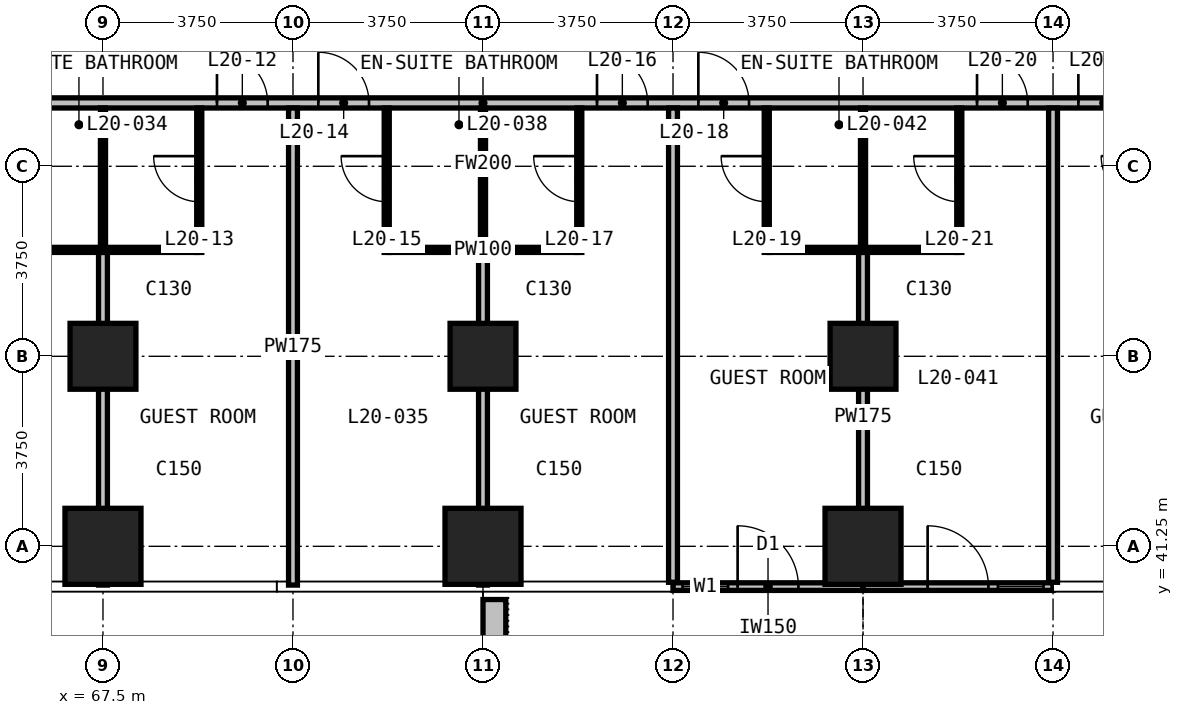
"""IFC4 building model, lengths in metres.
Left out: names, types, materials, properties, quantities, classifications, styles, units other than length and angle.
Written with IfcOpenShell. Run it as: python <this file> out.ifc"""

import sys

from ifc_helpers import new_model, si_unit, direction, frame, frame_2d, origin, origin_2d, place, context, subcontext, project, spatial, rectangle, extrude, element, fill, save


model = new_model("IFC4")
c1 = context("Model", 3, precision=1e-05, world=origin(), true_north=direction((0.0, 1.0)))
c2 = subcontext(c1, "Body", "Model", "MODEL_VIEW")
j1 = project(units=[si_unit("LENGTHUNIT", "METRE"), si_unit("PLANEANGLEUNIT", "RADIAN")], contexts=[c1])
p1 = place(None, origin())
s1 = spatial("IfcSite", under=j1, at=p1, CompositionType="ELEMENT")
p2 = place(p1, origin())
s2 = spatial("IfcBuilding", under=s1, at=p2, CompositionType="ELEMENT")
p3 = place(p2, frame((0.0, 0.0, 85.7)))
s3 = spatial("IfcBuildingStorey", under=s2, at=p3, CompositionType="ELEMENT", Elevation=85.7)
p4 = place(p3, frame((67.5, 41.25, 0.0), z_axis=(0.0, 0.0, 1.0), x_axis=(1.0, 0.0, 0.0)))
e1 = element("IfcColumn", 1, at=p4, inside=s3, PredefinedType="COLUMN", context=c2, shape_type="SweptSolid", body=[
    extrude(rectangle(XDim=1.5, YDim=1.5, at=origin_2d()), origin(), (0.0, 0.0, 1.0), 3.3),
])
p5 = place(p3, frame((67.5, 45.0, 0.0), z_axis=(0.0, 0.0, 1.0), x_axis=(1.0, 0.0, 0.0)))
e2 = element("IfcColumn", 2, at=p5, inside=s3, PredefinedType="COLUMN", context=c2, shape_type="SweptSolid", body=[
    extrude(rectangle(XDim=1.3, YDim=1.3, at=origin_2d()), origin(), (0.0, 0.0, 1.0), 3.3),
])
p6 = place(p3, frame((75.0, 41.25, 0.0), z_axis=(0.0, 0.0, 1.0), x_axis=(1.0, 0.0, 0.0)))
e3 = element("IfcColumn", 3, at=p6, inside=s3, PredefinedType="COLUMN", context=c2, shape_type="SweptSolid", body=[
    extrude(rectangle(XDim=1.5, YDim=1.5, at=origin_2d()), origin(), (0.0, 0.0, 1.0), 3.3),
])
p7 = place(p3, frame((75.0, 45.0, 0.0), z_axis=(0.0, 0.0, 1.0), x_axis=(1.0, 0.0, 0.0)))
e4 = element("IfcColumn", 4, at=p7, inside=s3, PredefinedType="COLUMN", context=c2, shape_type="SweptSolid", body=[
    extrude(rectangle(XDim=1.3, YDim=1.3, at=origin_2d()), origin(), (0.0, 0.0, 1.0), 3.3),
])
p8 = place(p3, frame((82.5, 41.25, 0.0), z_axis=(0.0, 0.0, 1.0), x_axis=(1.0, 0.0, 0.0)))
e5 = element("IfcColumn", 5, at=p8, inside=s3, PredefinedType="COLUMN", context=c2, shape_type="SweptSolid", body=[
    extrude(rectangle(XDim=1.5, YDim=1.5, at=origin_2d()), origin(), (0.0, 0.0, 1.0), 3.3),
])
p9 = place(p3, frame((82.5, 45.0, 0.0), z_axis=(0.0, 0.0, 1.0), x_axis=(1.0, 0.0, 0.0)))
e6 = element("IfcColumn", 6, at=p9, inside=s3, PredefinedType="COLUMN", context=c2, shape_type="SweptSolid", body=[
    extrude(rectangle(XDim=1.3, YDim=1.3, at=origin_2d()), origin(), (0.0, 0.0, 1.0), 3.3),
])
p10 = place(p3, frame((78.75, 40.455, 0.0), z_axis=(0.0, 0.0, 1.0), x_axis=(1.0, 0.0, 0.0)))
e7 = element("IfcWall", 7, at=p10, inside=s3, PredefinedType="SOLIDWALL", context=c2, shape_type="SweptSolid", body=[
    extrude(rectangle(XDim=3.75, YDim=0.15, at=frame_2d((1.875, 0.0))), origin(), (0.0, 0.0, 1.0), 3.0),
])
p11 = place(p10, frame((0.188, 0.0, 0.1)))
e8 = element("IfcOpeningElement", 8, at=p11, cuts=e7, PredefinedType="OPENING", context=c2, shape_type="SweptSolid", body=[
    extrude(rectangle(XDim=0.9, YDim=2.4, at=frame_2d((0.45, 1.2))), frame((0.0, 0.085, 0.0), z_axis=(0.0, -1.0, 0.0), x_axis=(1.0, 0.0, 0.0)), (0.0, 0.0, 1.0), 0.17),
])
p12 = place(p10, frame((1.275, 0.0, 0.0)))
e9 = element("IfcOpeningElement", 9, at=p12, cuts=e7, PredefinedType="OPENING", context=c2, shape_type="SweptSolid", body=[
    extrude(rectangle(XDim=1.2, YDim=2.4, at=frame_2d((0.6, 1.2))), frame((0.0, 0.085, 0.0), z_axis=(0.0, -1.0, 0.0), x_axis=(1.0, 0.0, 0.0)), (0.0, 0.0, 1.0), 0.17),
])
p13 = place(p3, frame((82.5, 40.455, 0.0), z_axis=(0.0, 0.0, 1.0), x_axis=(1.0, 0.0, 0.0)))
e10 = element("IfcWall", 10, at=p13, inside=s3, PredefinedType="SOLIDWALL", context=c2, shape_type="SweptSolid", body=[
    extrude(rectangle(XDim=3.75, YDim=0.15, at=frame_2d((1.875, 0.0))), origin(), (0.0, 0.0, 1.0), 3.0),
])
p14 = place(p13, frame((1.275, 0.0, 0.0)))
e11 = element("IfcOpeningElement", 11, at=p14, cuts=e10, PredefinedType="OPENING", context=c2, shape_type="SweptSolid", body=[
    extrude(rectangle(XDim=1.2, YDim=2.4, at=frame_2d((0.6, 1.2))), frame((0.0, 0.085, 0.0), z_axis=(0.0, -1.0, 0.0), x_axis=(1.0, 0.0, 0.0)), (0.0, 0.0, 1.0), 0.17),
])
p15 = place(p13, frame((2.663, 0.0, 0.1)))
e12 = element("IfcOpeningElement", 12, at=p15, cuts=e10, PredefinedType="OPENING", context=c2, shape_type="SweptSolid", body=[
    extrude(rectangle(XDim=0.9, YDim=2.4, at=frame_2d((0.45, 1.2))), frame((0.0, 0.085, 0.0), z_axis=(0.0, -1.0, 0.0), x_axis=(1.0, 0.0, 0.0)), (0.0, 0.0, 1.0), 0.17),
])
p16 = place(p3, frame((75.225, 40.2, 0.0), z_axis=(0.0, 0.0, 1.0), x_axis=(0.0, -1.0, 0.0)))
e13 = element("IfcWall", 13, at=p16, inside=s3, PredefinedType="USERDEFINED", context=c2, shape_type="SweptSolid", body=[
    extrude(rectangle(XDim=2.35, YDim=0.45, at=frame_2d((1.175, 0.0))), origin(), (0.0, 0.0, 1.0), 1.1),
])
p17 = place(p3, frame((51.735, 50.0, 0.0), z_axis=(0.0, 0.0, 1.0), x_axis=(1.0, 0.0, 0.0)))
e14 = element("IfcWall", 14, at=p17, inside=s3, PredefinedType="PARTITIONING", context=c2, shape_type="SweptSolid", body=[
    extrude(rectangle(XDim=46.53, YDim=0.2, at=frame_2d((23.265, 0.0))), origin(), (0.0, 0.0, 1.0), 3.0),
])
p18 = place(p17, frame((6.765, 0.0, 0.0)))
e15 = element("IfcOpeningElement", 15, at=p18, cuts=e14, PredefinedType="OPENING", context=c2, shape_type="SweptSolid", body=[
    extrude(rectangle(XDim=1.0, YDim=2.2, at=frame_2d((0.5, 1.1))), frame((0.0, 0.11, 0.0), z_axis=(0.0, -1.0, 0.0), x_axis=(1.0, 0.0, 0.0)), (0.0, 0.0, 1.0), 0.22),
])
p19 = place(p17, frame((10.515, 0.0, 0.0)))
e16 = element("IfcOpeningElement", 16, at=p19, cuts=e14, PredefinedType="OPENING", context=c2, shape_type="SweptSolid", body=[
    extrude(rectangle(XDim=1.0, YDim=2.2, at=frame_2d((0.5, 1.1))), frame((0.0, 0.11, 0.0), z_axis=(0.0, -1.0, 0.0), x_axis=(1.0, 0.0, 0.0)), (0.0, 0.0, 1.0), 0.22),
])
p20 = place(p17, frame((12.515, 0.0, 0.0)))
e17 = element("IfcOpeningElement", 17, at=p20, cuts=e14, PredefinedType="OPENING", context=c2, shape_type="SweptSolid", body=[
    extrude(rectangle(XDim=1.0, YDim=2.2, at=frame_2d((0.5, 1.1))), frame((0.0, 0.11, 0.0), z_axis=(0.0, -1.0, 0.0), x_axis=(1.0, 0.0, 0.0)), (0.0, 0.0, 1.0), 0.22),
])
p21 = place(p17, frame((18.015, 0.0, 0.0)))
e18 = element("IfcOpeningElement", 18, at=p21, cuts=e14, PredefinedType="OPENING", context=c2, shape_type="SweptSolid", body=[
    extrude(rectangle(XDim=1.0, YDim=2.2, at=frame_2d((0.5, 1.1))), frame((0.0, 0.11, 0.0), z_axis=(0.0, -1.0, 0.0), x_axis=(1.0, 0.0, 0.0)), (0.0, 0.0, 1.0), 0.22),
])
p22 = place(p17, frame((20.015, 0.0, 0.0)))
e19 = element("IfcOpeningElement", 19, at=p22, cuts=e14, PredefinedType="OPENING", context=c2, shape_type="SweptSolid", body=[
    extrude(rectangle(XDim=1.0, YDim=2.2, at=frame_2d((0.5, 1.1))), frame((0.0, 0.11, 0.0), z_axis=(0.0, -1.0, 0.0), x_axis=(1.0, 0.0, 0.0)), (0.0, 0.0, 1.0), 0.22),
])
p23 = place(p17, frame((25.515, 0.0, 0.0)))
e20 = element("IfcOpeningElement", 20, at=p23, cuts=e14, PredefinedType="OPENING", context=c2, shape_type="SweptSolid", body=[
    extrude(rectangle(XDim=1.0, YDim=2.2, at=frame_2d((0.5, 1.1))), frame((0.0, 0.11, 0.0), z_axis=(0.0, -1.0, 0.0), x_axis=(1.0, 0.0, 0.0)), (0.0, 0.0, 1.0), 0.22),
])
p24 = place(p17, frame((27.515, 0.0, 0.0)))
e21 = element("IfcOpeningElement", 21, at=p24, cuts=e14, PredefinedType="OPENING", context=c2, shape_type="SweptSolid", body=[
    extrude(rectangle(XDim=1.0, YDim=2.2, at=frame_2d((0.5, 1.1))), frame((0.0, 0.11, 0.0), z_axis=(0.0, -1.0, 0.0), x_axis=(1.0, 0.0, 0.0)), (0.0, 0.0, 1.0), 0.22),
])
p25 = place(p17, frame((33.015, 0.0, 0.0)))
e22 = element("IfcOpeningElement", 22, at=p25, cuts=e14, PredefinedType="OPENING", context=c2, shape_type="SweptSolid", body=[
    extrude(rectangle(XDim=1.0, YDim=2.2, at=frame_2d((0.5, 1.1))), frame((0.0, 0.11, 0.0), z_axis=(0.0, -1.0, 0.0), x_axis=(1.0, 0.0, 0.0)), (0.0, 0.0, 1.0), 0.22),
])
p26 = place(p17, frame((35.015, 0.0, 0.0)))
e23 = element("IfcOpeningElement", 23, at=p26, cuts=e14, PredefinedType="OPENING", context=c2, shape_type="SweptSolid", body=[
    extrude(rectangle(XDim=1.0, YDim=2.2, at=frame_2d((0.5, 1.1))), frame((0.0, 0.11, 0.0), z_axis=(0.0, -1.0, 0.0), x_axis=(1.0, 0.0, 0.0)), (0.0, 0.0, 1.0), 0.22),
])
p27 = place(p17, frame((38.765, 0.0, 0.0)))
e24 = element("IfcOpeningElement", 24, at=p27, cuts=e14, PredefinedType="OPENING", context=c2, shape_type="SweptSolid", body=[
    extrude(rectangle(XDim=1.0, YDim=2.2, at=frame_2d((0.5, 1.1))), frame((0.0, 0.11, 0.0), z_axis=(0.0, -1.0, 0.0), x_axis=(1.0, 0.0, 0.0)), (0.0, 0.0, 1.0), 0.22),
])
p28 = place(p17, frame((1.8, 0.0, 0.0)))
e25 = element("IfcOpeningElement", 25, at=p28, cuts=e14, PredefinedType="OPENING", context=c2, shape_type="SweptSolid", body=[
    extrude(rectangle(XDim=0.9, YDim=2.2, at=frame_2d((0.45, 1.1))), frame((0.0, 0.11, 0.0), z_axis=(0.0, -1.0, 0.0), x_axis=(1.0, 0.0, 0.0)), (0.0, 0.0, 1.0), 0.22),
])
p29 = place(p17, frame((43.815, 0.0, 0.0)))
e26 = element("IfcOpeningElement", 26, at=p29, cuts=e14, PredefinedType="OPENING", context=c2, shape_type="SweptSolid", body=[
    extrude(rectangle(XDim=0.9, YDim=2.2, at=frame_2d((0.45, 1.1))), frame((0.0, 0.11, 0.0), z_axis=(0.0, -1.0, 0.0), x_axis=(1.0, 0.0, 0.0)), (0.0, 0.0, 1.0), 0.22),
])
p30 = place(p3, frame((67.5, 40.485, 0.0), z_axis=(0.0, 0.0, 1.0), x_axis=(0.0, 1.0, 0.0)))
e27 = element("IfcWall", 27, at=p30, inside=s3, PredefinedType="PARTITIONING", context=c2, shape_type="SweptSolid", body=[
    extrude(rectangle(XDim=6.565, YDim=0.175, at=frame_2d((3.282, 0.0))), origin(), (0.0, 0.0, 1.0), 3.0),
])
p31 = place(p3, frame((71.25, 40.485, 0.0), z_axis=(0.0, 0.0, 1.0), x_axis=(0.0, 1.0, 0.0)))
e28 = element("IfcWall", 28, at=p31, inside=s3, PredefinedType="PARTITIONING", context=c2, shape_type="SweptSolid", body=[
    extrude(rectangle(XDim=9.415, YDim=0.175, at=frame_2d((4.708, 0.0))), origin(), (0.0, 0.0, 1.0), 3.0),
])
p32 = place(p3, frame((75.0, 40.485, 0.0), z_axis=(0.0, 0.0, 1.0), x_axis=(0.0, 1.0, 0.0)))
e29 = element("IfcWall", 29, at=p32, inside=s3, PredefinedType="PARTITIONING", context=c2, shape_type="SweptSolid", body=[
    extrude(rectangle(XDim=6.565, YDim=0.175, at=frame_2d((3.282, 0.0))), origin(), (0.0, 0.0, 1.0), 3.0),
])
p33 = place(p3, frame((78.75, 40.54, 0.0), z_axis=(0.0, 0.0, 1.0), x_axis=(0.0, 1.0, 0.0)))
e30 = element("IfcWall", 30, at=p33, inside=s3, PredefinedType="PARTITIONING", context=c2, shape_type="SweptSolid", body=[
    extrude(rectangle(XDim=9.36, YDim=0.175, at=frame_2d((4.68, 0.0))), origin(), (0.0, 0.0, 1.0), 3.0),
])
p34 = place(p3, frame((82.5, 40.54, 0.0), z_axis=(0.0, 0.0, 1.0), x_axis=(0.0, 1.0, 0.0)))
e31 = element("IfcWall", 31, at=p34, inside=s3, PredefinedType="PARTITIONING", context=c2, shape_type="SweptSolid", body=[
    extrude(rectangle(XDim=6.51, YDim=0.175, at=frame_2d((3.255, 0.0))), origin(), (0.0, 0.0, 1.0), 3.0),
])
p35 = place(p3, frame((86.25, 40.54, 0.0), z_axis=(0.0, 0.0, 1.0), x_axis=(0.0, 1.0, 0.0)))
e32 = element("IfcWall", 32, at=p35, inside=s3, PredefinedType="PARTITIONING", context=c2, shape_type="SweptSolid", body=[
    extrude(rectangle(XDim=9.36, YDim=0.175, at=frame_2d((4.68, 0.0))), origin(), (0.0, 0.0, 1.0), 3.0),
])
for number, where, z_axis, x_axis in (
    (33, (65.65, 47.1, 0.0), (0.0, 0.0, 1.0), (1.0, 0.0, 0.0)),
    (34, (73.15, 47.1, 0.0), (0.0, 0.0, 1.0), (1.0, 0.0, 0.0)),
    (35, (80.65, 47.1, 0.0), (0.0, 0.0, 1.0), (1.0, 0.0, 0.0)),
):
    element("IfcWall", number, at=place(p3, frame(where, z_axis=z_axis, x_axis=x_axis)), inside=s3, PredefinedType="PARTITIONING", context=c2, shape_type="SweptSolid", body=[
        extrude(rectangle(XDim=3.7, YDim=0.1, at=frame_2d((1.85, 0.0))), origin(), (0.0, 0.0, 1.0), 3.0),
    ])
p36 = place(p3, frame((67.5, 47.15, 0.0), z_axis=(0.0, 0.0, 1.0), x_axis=(0.0, 1.0, 0.0)))
e36 = element("IfcWall", 36, at=p36, inside=s3, PredefinedType="PARTITIONING", context=c2, shape_type="SweptSolid", body=[
    extrude(rectangle(XDim=2.75, YDim=0.1, at=frame_2d((1.375, 0.0))), origin(), (0.0, 0.0, 1.0), 3.0),
])
p37 = place(p3, frame((69.4, 47.05, 0.0), z_axis=(0.0, 0.0, 1.0), x_axis=(0.0, 1.0, 0.0)))
e37 = element("IfcWall", 37, at=p37, inside=s3, PredefinedType="PARTITIONING", context=c2, shape_type="SweptSolid", body=[
    extrude(rectangle(XDim=2.85, YDim=0.1, at=frame_2d((1.425, 0.0))), origin(), (0.0, 0.0, 1.0), 3.0),
])
p38 = place(p37, frame((1.0, 0.0, 0.0)))
e38 = element("IfcOpeningElement", 38, at=p38, cuts=e37, PredefinedType="OPENING", context=c2, shape_type="SweptSolid", body=[
    extrude(rectangle(XDim=0.9, YDim=2.2, at=frame_2d((0.45, 1.1))), frame((0.0, 0.06, 0.0), z_axis=(0.0, -1.0, 0.0), x_axis=(1.0, 0.0, 0.0)), (0.0, 0.0, 1.0), 0.12),
])
p39 = place(p3, frame((73.1, 47.05, 0.0), z_axis=(0.0, 0.0, 1.0), x_axis=(0.0, 1.0, 0.0)))
e39 = element("IfcWall", 39, at=p39, inside=s3, PredefinedType="PARTITIONING", context=c2, shape_type="SweptSolid", body=[
    extrude(rectangle(XDim=2.85, YDim=0.1, at=frame_2d((1.425, 0.0))), origin(), (0.0, 0.0, 1.0), 3.0),
])
p40 = place(p39, frame((1.0, 0.0, 0.0)))
e40 = element("IfcOpeningElement", 40, at=p40, cuts=e39, PredefinedType="OPENING", context=c2, shape_type="SweptSolid", body=[
    extrude(rectangle(XDim=0.9, YDim=2.2, at=frame_2d((0.45, 1.1))), frame((0.0, 0.06, 0.0), z_axis=(0.0, -1.0, 0.0), x_axis=(1.0, 0.0, 0.0)), (0.0, 0.0, 1.0), 0.12),
])
p41 = place(p3, frame((75.0, 47.15, 0.0), z_axis=(0.0, 0.0, 1.0), x_axis=(0.0, 1.0, 0.0)))
e41 = element("IfcWall", 41, at=p41, inside=s3, PredefinedType="PARTITIONING", context=c2, shape_type="SweptSolid", body=[
    extrude(rectangle(XDim=2.75, YDim=0.1, at=frame_2d((1.375, 0.0))), origin(), (0.0, 0.0, 1.0), 3.0),
])
p42 = place(p3, frame((76.9, 47.05, 0.0), z_axis=(0.0, 0.0, 1.0), x_axis=(0.0, 1.0, 0.0)))
e42 = element("IfcWall", 42, at=p42, inside=s3, PredefinedType="PARTITIONING", context=c2, shape_type="SweptSolid", body=[
    extrude(rectangle(XDim=2.85, YDim=0.1, at=frame_2d((1.425, 0.0))), origin(), (0.0, 0.0, 1.0), 3.0),
])
p43 = place(p42, frame((1.0, 0.0, 0.0)))
e43 = element("IfcOpeningElement", 43, at=p43, cuts=e42, PredefinedType="OPENING", context=c2, shape_type="SweptSolid", body=[
    extrude(rectangle(XDim=0.9, YDim=2.2, at=frame_2d((0.45, 1.1))), frame((0.0, 0.06, 0.0), z_axis=(0.0, -1.0, 0.0), x_axis=(1.0, 0.0, 0.0)), (0.0, 0.0, 1.0), 0.12),
])
p44 = place(p3, frame((80.6, 47.05, 0.0), z_axis=(0.0, 0.0, 1.0), x_axis=(0.0, 1.0, 0.0)))
e44 = element("IfcWall", 44, at=p44, inside=s3, PredefinedType="PARTITIONING", context=c2, shape_type="SweptSolid", body=[
    extrude(rectangle(XDim=2.85, YDim=0.1, at=frame_2d((1.425, 0.0))), origin(), (0.0, 0.0, 1.0), 3.0),
])
p45 = place(p44, frame((1.0, 0.0, 0.0)))
e45 = element("IfcOpeningElement", 45, at=p45, cuts=e44, PredefinedType="OPENING", context=c2, shape_type="SweptSolid", body=[
    extrude(rectangle(XDim=0.9, YDim=2.2, at=frame_2d((0.45, 1.1))), frame((0.0, 0.06, 0.0), z_axis=(0.0, -1.0, 0.0), x_axis=(1.0, 0.0, 0.0)), (0.0, 0.0, 1.0), 0.12),
])
p46 = place(p3, frame((82.5, 47.15, 0.0), z_axis=(0.0, 0.0, 1.0), x_axis=(0.0, 1.0, 0.0)))
e46 = element("IfcWall", 46, at=p46, inside=s3, PredefinedType="PARTITIONING", context=c2, shape_type="SweptSolid", body=[
    extrude(rectangle(XDim=2.75, YDim=0.1, at=frame_2d((1.375, 0.0))), origin(), (0.0, 0.0, 1.0), 3.0),
])
p47 = place(p3, frame((84.4, 47.05, 0.0), z_axis=(0.0, 0.0, 1.0), x_axis=(0.0, 1.0, 0.0)))
e47 = element("IfcWall", 47, at=p47, inside=s3, PredefinedType="PARTITIONING", context=c2, shape_type="SweptSolid", body=[
    extrude(rectangle(XDim=2.85, YDim=0.1, at=frame_2d((1.425, 0.0))), origin(), (0.0, 0.0, 1.0), 3.0),
])
p48 = place(p47, frame((1.0, 0.0, 0.0)))
e48 = element("IfcOpeningElement", 48, at=p48, cuts=e47, PredefinedType="OPENING", context=c2, shape_type="SweptSolid", body=[
    extrude(rectangle(XDim=0.9, YDim=2.2, at=frame_2d((0.45, 1.1))), frame((0.0, 0.06, 0.0), z_axis=(0.0, -1.0, 0.0), x_axis=(1.0, 0.0, 0.0)), (0.0, 0.0, 1.0), 0.12),
])
p49 = place(p11, origin())
e49 = element("IfcWindow", 49, at=p49, inside=s3, PartitioningType="SINGLE_PANEL", PredefinedType="WINDOW", context=c2, shape_type="SweptSolid", body=[
    extrude(rectangle(XDim=0.9, YDim=2.4, at=frame_2d((0.45, 1.2))), frame((0.0, 0.03, 0.0), z_axis=(0.0, -1.0, 0.0), x_axis=(1.0, 0.0, 0.0)), (0.0, 0.0, 1.0), 0.06),
])
fill(e8, e49)
p50 = place(p12, origin())
e50 = element("IfcDoor", 50, at=p50, inside=s3, OperationType="SINGLE_SWING_LEFT", PredefinedType="DOOR", context=c2, shape_type="SweptSolid", body=[
    extrude(rectangle(XDim=1.2, YDim=2.4, at=frame_2d((0.6, 1.2))), frame((0.0, 0.025, 0.0), z_axis=(0.0, -1.0, 0.0), x_axis=(1.0, 0.0, 0.0)), (0.0, 0.0, 1.0), 0.05),
])
fill(e9, e50)
p51 = place(p14, origin())
e51 = element("IfcDoor", 51, at=p51, inside=s3, OperationType="SINGLE_SWING_LEFT", PredefinedType="DOOR", context=c2, shape_type="SweptSolid", body=[
    extrude(rectangle(XDim=1.2, YDim=2.4, at=frame_2d((0.6, 1.2))), frame((0.0, 0.025, 0.0), z_axis=(0.0, -1.0, 0.0), x_axis=(1.0, 0.0, 0.0)), (0.0, 0.0, 1.0), 0.05),
])
fill(e11, e51)
p52 = place(p15, origin())
e52 = element("IfcWindow", 52, at=p52, inside=s3, PartitioningType="SINGLE_PANEL", PredefinedType="WINDOW", context=c2, shape_type="SweptSolid", body=[
    extrude(rectangle(XDim=0.9, YDim=2.4, at=frame_2d((0.45, 1.2))), frame((0.0, 0.03, 0.0), z_axis=(0.0, -1.0, 0.0), x_axis=(1.0, 0.0, 0.0)), (0.0, 0.0, 1.0), 0.06),
])
fill(e12, e52)
p53 = place(p21, origin())
e53 = element("IfcDoor", 53, at=p53, inside=s3, OperationType="SINGLE_SWING_LEFT", PredefinedType="DOOR", context=c2, shape_type="SweptSolid", body=[
    extrude(rectangle(XDim=1.0, YDim=2.2, at=frame_2d((0.5, 1.1))), frame((0.0, 0.025, 0.0), z_axis=(0.0, -1.0, 0.0), x_axis=(1.0, 0.0, 0.0)), (0.0, 0.0, 1.0), 0.05),
])
fill(e18, e53)
p54 = place(p38, origin())
e54 = element("IfcDoor", 54, at=p54, inside=s3, OperationType="SINGLE_SWING_RIGHT", PredefinedType="DOOR", context=c2, shape_type="SweptSolid", body=[
    extrude(rectangle(XDim=0.9, YDim=2.2, at=frame_2d((0.45, 1.1))), frame((0.0, 0.025, 0.0), z_axis=(0.0, -1.0, 0.0), x_axis=(1.0, 0.0, 0.0)), (0.0, 0.0, 1.0), 0.05),
])
fill(e38, e54)
p55 = place(p22, origin())
e55 = element("IfcDoor", 55, at=p55, inside=s3, OperationType="SINGLE_SWING_LEFT", PredefinedType="DOOR", context=c2, shape_type="SweptSolid", body=[
    extrude(rectangle(XDim=1.0, YDim=2.2, at=frame_2d((0.5, 1.1))), frame((0.0, 0.025, 0.0), z_axis=(0.0, -1.0, 0.0), x_axis=(1.0, 0.0, 0.0)), (0.0, 0.0, 1.0), 0.05),
])
fill(e19, e55)
p56 = place(p40, origin())
e56 = element("IfcDoor", 56, at=p56, inside=s3, OperationType="SINGLE_SWING_RIGHT", PredefinedType="DOOR", context=c2, shape_type="SweptSolid", body=[
    extrude(rectangle(XDim=0.9, YDim=2.2, at=frame_2d((0.45, 1.1))), frame((0.0, 0.025, 0.0), z_axis=(0.0, -1.0, 0.0), x_axis=(1.0, 0.0, 0.0)), (0.0, 0.0, 1.0), 0.05),
])
fill(e40, e56)
p57 = place(p23, origin())
e57 = element("IfcDoor", 57, at=p57, inside=s3, OperationType="SINGLE_SWING_RIGHT", PredefinedType="DOOR", context=c2, shape_type="SweptSolid", body=[
    extrude(rectangle(XDim=1.0, YDim=2.2, at=frame_2d((0.5, 1.1))), frame((0.0, 0.025, 0.0), z_axis=(0.0, -1.0, 0.0), x_axis=(1.0, 0.0, 0.0)), (0.0, 0.0, 1.0), 0.05),
])
fill(e20, e57)
p58 = place(p43, origin())
e58 = element("IfcDoor", 58, at=p58, inside=s3, OperationType="SINGLE_SWING_RIGHT", PredefinedType="DOOR", context=c2, shape_type="SweptSolid", body=[
    extrude(rectangle(XDim=0.9, YDim=2.2, at=frame_2d((0.45, 1.1))), frame((0.0, 0.025, 0.0), z_axis=(0.0, -1.0, 0.0), x_axis=(1.0, 0.0, 0.0)), (0.0, 0.0, 1.0), 0.05),
])
fill(e43, e58)
p59 = place(p24, origin())
e59 = element("IfcDoor", 59, at=p59, inside=s3, OperationType="SINGLE_SWING_LEFT", PredefinedType="DOOR", context=c2, shape_type="SweptSolid", body=[
    extrude(rectangle(XDim=1.0, YDim=2.2, at=frame_2d((0.5, 1.1))), frame((0.0, 0.025, 0.0), z_axis=(0.0, -1.0, 0.0), x_axis=(1.0, 0.0, 0.0)), (0.0, 0.0, 1.0), 0.05),
])
fill(e21, e59)
p60 = place(p45, origin())
e60 = element("IfcDoor", 60, at=p60, inside=s3, OperationType="SINGLE_SWING_RIGHT", PredefinedType="DOOR", context=c2, shape_type="SweptSolid", body=[
    extrude(rectangle(XDim=0.9, YDim=2.2, at=frame_2d((0.45, 1.1))), frame((0.0, 0.025, 0.0), z_axis=(0.0, -1.0, 0.0), x_axis=(1.0, 0.0, 0.0)), (0.0, 0.0, 1.0), 0.05),
])
fill(e45, e60)
p61 = place(p25, origin())
e61 = element("IfcDoor", 61, at=p61, inside=s3, OperationType="SINGLE_SWING_RIGHT", PredefinedType="DOOR", context=c2, shape_type="SweptSolid", body=[
    extrude(rectangle(XDim=1.0, YDim=2.2, at=frame_2d((0.5, 1.1))), frame((0.0, 0.025, 0.0), z_axis=(0.0, -1.0, 0.0), x_axis=(1.0, 0.0, 0.0)), (0.0, 0.0, 1.0), 0.05),
])
fill(e22, e61)
p62 = place(p48, origin())
e62 = element("IfcDoor", 62, at=p62, inside=s3, OperationType="SINGLE_SWING_RIGHT", PredefinedType="DOOR", context=c2, shape_type="SweptSolid", body=[
    extrude(rectangle(XDim=0.9, YDim=2.2, at=frame_2d((0.45, 1.1))), frame((0.0, 0.025, 0.0), z_axis=(0.0, -1.0, 0.0), x_axis=(1.0, 0.0, 0.0)), (0.0, 0.0, 1.0), 0.05),
])
fill(e48, e62)
p63 = place(p26, origin())
e63 = element("IfcDoor", 63, at=p63, inside=s3, OperationType="SINGLE_SWING_LEFT", PredefinedType="DOOR", context=c2, shape_type="SweptSolid", body=[
    extrude(rectangle(XDim=1.0, YDim=2.2, at=frame_2d((0.5, 1.1))), frame((0.0, 0.025, 0.0), z_axis=(0.0, -1.0, 0.0), x_axis=(1.0, 0.0, 0.0)), (0.0, 0.0, 1.0), 0.05),
])
fill(e23, e63)
save(model, sys.argv[1])
